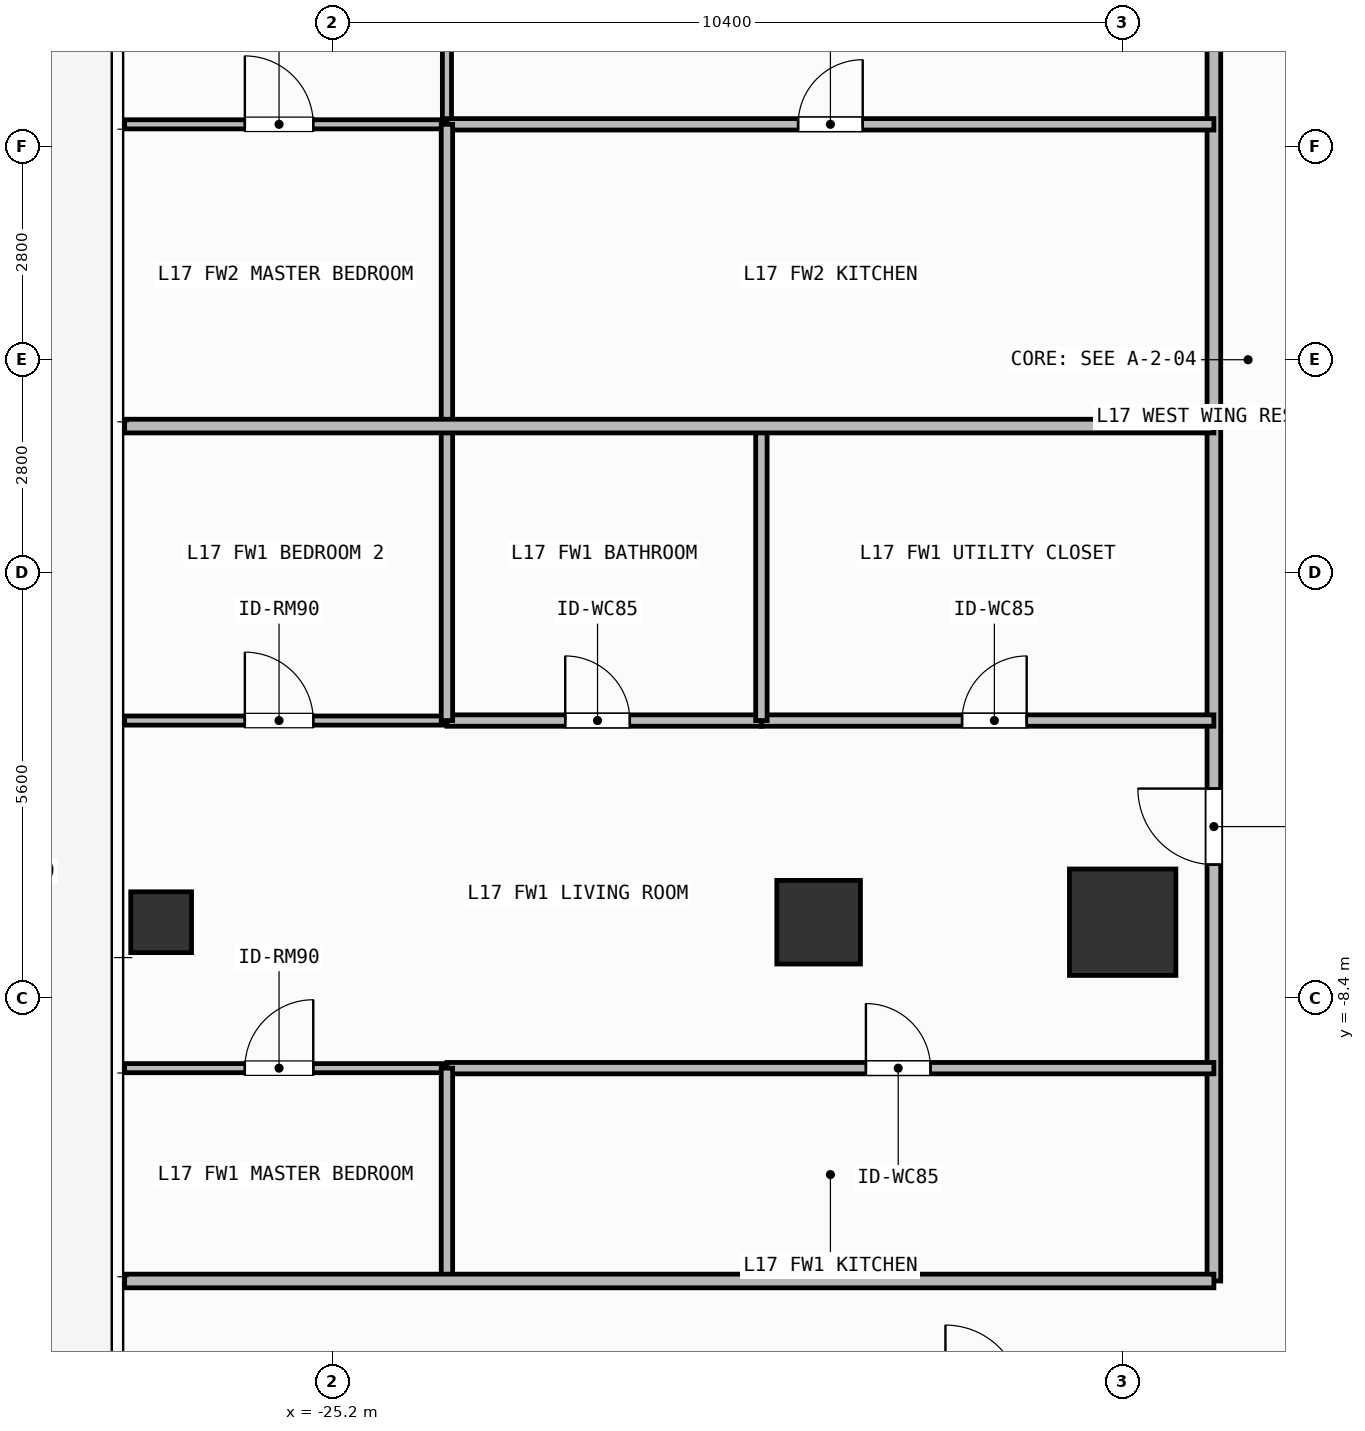
"""IFC4 building model, lengths in metres.
Left out: names, types, materials, properties, quantities, classifications, styles, units other than length and angle.
Written with IfcOpenShell. Run it as: python <this file> out.ifc"""

import sys

from ifc_helpers import new_model, si_unit, direction, frame, frame_2d, origin, origin_2d, place, context, subcontext, project, spatial, rectangle, hollow_rectangle, extrude, element, fill, save


model = new_model("IFC4")
c1 = context("Model", 3, precision=1e-05, world=origin(), true_north=direction((0.0, 1.0)))
c2 = subcontext(c1, "Body", "Model", "MODEL_VIEW")
j1 = project(units=[si_unit("LENGTHUNIT", "METRE"), si_unit("PLANEANGLEUNIT", "RADIAN")], contexts=[c1])
p1 = place(None, origin())
s1 = spatial("IfcSite", under=j1, at=p1, CompositionType="ELEMENT")
p2 = place(p1, origin())
s2 = spatial("IfcBuilding", under=s1, at=p2, CompositionType="ELEMENT")
p3 = place(p2, frame((0.0, 0.0, 65.7)))
s3 = spatial("IfcBuildingStorey", under=s2, at=p3, CompositionType="ELEMENT", Elevation=65.7)
p4 = place(p3, frame((-14.8, -7.4, 0.0), z_axis=(0.0, 0.0, 1.0), x_axis=(1.0, 0.0, 0.0)))
e1 = element("IfcColumn", 1, at=p4, inside=s3, PredefinedType="COLUMN", context=c2, shape_type="SweptSolid", body=[
    extrude(rectangle(XDim=1.4, YDim=1.4, at=origin_2d()), origin(), (0.0, 0.0, 1.0), 3.9),
])
p5 = place(p3, frame((-18.8, -7.4, 0.0), z_axis=(0.0, 0.0, 1.0), x_axis=(1.0, 0.0, 0.0)))
e2 = element("IfcColumn", 2, at=p5, inside=s3, PredefinedType="COLUMN", context=c2, shape_type="SweptSolid", body=[
    extrude(rectangle(XDim=1.1, YDim=1.1, at=origin_2d()), origin(), (0.0, 0.0, 1.0), 3.9),
])
p6 = place(p3, frame((-27.45, -7.4, 0.0), z_axis=(0.0, 0.0, 1.0), x_axis=(1.0, 0.0, 0.0)))
e3 = element("IfcColumn", 3, at=p6, inside=s3, PredefinedType="COLUMN", context=c2, shape_type="SweptSolid", body=[
    extrude(hollow_rectangle(XDim=0.8, YDim=0.8, WallThickness=0.036, at=origin_2d()), origin(), (0.0, 0.0, 1.0), 3.9),
])
p7 = place(p3, frame((-13.6, -12.12, 0.0), z_axis=(0.0, 0.0, 1.0), x_axis=(0.0, 1.0, 0.0)))
e4 = element("IfcWall", 4, at=p7, inside=s3, PredefinedType="PARTITIONING", context=c2, shape_type="SweptSolid", body=[
    extrude(rectangle(XDim=11.247, YDim=0.18, at=frame_2d((5.624, 0.0))), origin(), (0.0, 0.0, 1.0), 3.68),
])
p8 = place(p7, frame((5.478, 0.0, 0.0)))
e5 = element("IfcOpeningElement", 5, at=p8, cuts=e4, PredefinedType="OPENING", context=c2, shape_type="SweptSolid", body=[
    extrude(rectangle(XDim=1.0, YDim=2.2, at=frame_2d((0.5, 1.1))), frame((0.0, 0.1, 0.0), z_axis=(0.0, -1.0, 0.0), x_axis=(1.0, 0.0, 0.0)), (0.0, 0.0, 1.0), 0.2),
])
p9 = place(p3, frame((-23.69, -4.747, 0.0), z_axis=(0.0, 0.0, 1.0), x_axis=(1.0, 0.0, 0.0)))
e6 = element("IfcWall", 6, at=p9, inside=s3, PredefinedType="PARTITIONING", context=c2, shape_type="SweptSolid", body=[
    extrude(rectangle(XDim=4.137, YDim=0.15, at=frame_2d((2.068, 0.0))), origin(), (0.0, 0.0, 1.0), 3.68),
])
p10 = place(p9, frame((1.556, 0.0, 0.0)))
e7 = element("IfcOpeningElement", 7, at=p10, cuts=e6, PredefinedType="OPENING", context=c2, shape_type="SweptSolid", body=[
    extrude(rectangle(XDim=0.85, YDim=2.1, at=frame_2d((0.425, 1.05))), frame((0.0, 0.085, 0.0), z_axis=(0.0, -1.0, 0.0), x_axis=(1.0, 0.0, 0.0)), (0.0, 0.0, 1.0), 0.17),
])
p11 = place(p3, frame((-19.553, -4.747, 0.0), z_axis=(0.0, 0.0, 1.0), x_axis=(1.0, 0.0, 0.0)))
e8 = element("IfcWall", 8, at=p11, inside=s3, PredefinedType="PARTITIONING", context=c2, shape_type="SweptSolid", body=[
    extrude(rectangle(XDim=5.953, YDim=0.15, at=frame_2d((2.977, 0.0))), origin(), (0.0, 0.0, 1.0), 3.68),
])
p12 = place(p11, frame((2.64, 0.0, 0.0)))
e9 = element("IfcOpeningElement", 9, at=p12, cuts=e8, PredefinedType="OPENING", context=c2, shape_type="SweptSolid", body=[
    extrude(rectangle(XDim=0.85, YDim=2.1, at=frame_2d((0.425, 1.05))), frame((0.0, 0.085, 0.0), z_axis=(0.0, -1.0, 0.0), x_axis=(1.0, 0.0, 0.0)), (0.0, 0.0, 1.0), 0.17),
])
p13 = place(p3, frame((-23.69, -9.32, 0.0), z_axis=(0.0, 0.0, 1.0), x_axis=(1.0, 0.0, 0.0)))
e10 = element("IfcWall", 10, at=p13, inside=s3, PredefinedType="PARTITIONING", context=c2, shape_type="SweptSolid", body=[
    extrude(rectangle(XDim=10.09, YDim=0.15, at=frame_2d((5.045, 0.0))), origin(), (0.0, 0.0, 1.0), 3.68),
])
p14 = place(p13, frame((5.512, 0.0, 0.0)))
e11 = element("IfcOpeningElement", 11, at=p14, cuts=e10, PredefinedType="OPENING", context=c2, shape_type="SweptSolid", body=[
    extrude(rectangle(XDim=0.85, YDim=2.1, at=frame_2d((0.425, 1.05))), frame((0.0, 0.085, 0.0), z_axis=(0.0, -1.0, 0.0), x_axis=(1.0, 0.0, 0.0)), (0.0, 0.0, 1.0), 0.17),
])
p15 = place(p3, frame((-27.93, -9.32, 0.0), z_axis=(0.0, 0.0, 1.0), x_axis=(1.0, 0.0, 0.0)))
e12 = element("IfcWall", 12, at=p15, inside=s3, PredefinedType="PARTITIONING", context=c2, shape_type="SweptSolid", body=[
    extrude(rectangle(XDim=4.24, YDim=0.12, at=frame_2d((2.12, 0.0))), origin(), (0.0, 0.0, 1.0), 3.68),
])
p16 = place(p15, frame((1.581, 0.0, 0.0)))
e13 = element("IfcOpeningElement", 13, at=p16, cuts=e12, PredefinedType="OPENING", context=c2, shape_type="SweptSolid", body=[
    extrude(rectangle(XDim=0.9, YDim=2.1, at=frame_2d((0.45, 1.05))), frame((0.0, 0.07, 0.0), z_axis=(0.0, -1.0, 0.0), x_axis=(1.0, 0.0, 0.0)), (0.0, 0.0, 1.0), 0.14),
])
p17 = place(p3, frame((-27.93, -4.747, 0.0), z_axis=(0.0, 0.0, 1.0), x_axis=(1.0, 0.0, 0.0)))
e14 = element("IfcWall", 14, at=p17, inside=s3, PredefinedType="PARTITIONING", context=c2, shape_type="SweptSolid", body=[
    extrude(rectangle(XDim=4.24, YDim=0.12, at=frame_2d((2.12, 0.0))), origin(), (0.0, 0.0, 1.0), 3.68),
])
p18 = place(p17, frame((1.581, 0.0, 0.0)))
e15 = element("IfcOpeningElement", 15, at=p18, cuts=e14, PredefinedType="OPENING", context=c2, shape_type="SweptSolid", body=[
    extrude(rectangle(XDim=0.9, YDim=2.1, at=frame_2d((0.45, 1.05))), frame((0.0, 0.07, 0.0), z_axis=(0.0, -1.0, 0.0), x_axis=(1.0, 0.0, 0.0)), (0.0, 0.0, 1.0), 0.14),
])
p19 = place(p3, frame((-13.6, -0.873, 0.0), z_axis=(0.0, 0.0, 1.0), x_axis=(0.0, 1.0, 0.0)))
e16 = element("IfcWall", 16, at=p19, inside=s3, PredefinedType="PARTITIONING", context=c2, shape_type="SweptSolid", body=[
    extrude(rectangle(XDim=12.993, YDim=0.18, at=frame_2d((6.497, 0.0))), origin(), (0.0, 0.0, 1.0), 3.68),
])
p20 = place(p19, frame((6.446, 0.0, 0.0)))
e17 = element("IfcOpeningElement", 17, at=p20, cuts=e16, PredefinedType="OPENING", context=c2, shape_type="SweptSolid", body=[
    extrude(rectangle(XDim=1.0, YDim=2.2, at=frame_2d((0.5, 1.1))), frame((0.0, 0.1, 0.0), z_axis=(0.0, -1.0, 0.0), x_axis=(1.0, 0.0, 0.0)), (0.0, 0.0, 1.0), 0.2),
])
p21 = place(p3, frame((-23.69, 3.097, 0.0), z_axis=(0.0, 0.0, 1.0), x_axis=(0.0, 1.0, 0.0)))
e18 = element("IfcWall", 18, at=p21, inside=s3, PredefinedType="PARTITIONING", context=c2, shape_type="SweptSolid", body=[
    extrude(rectangle(XDim=6.223, YDim=0.12, at=frame_2d((3.112, 0.0))), origin(), (0.0, 0.0, 1.0), 3.68),
])
p22 = place(p21, frame((2.662, 0.0, 0.0)))
e19 = element("IfcOpeningElement", 19, at=p22, cuts=e18, PredefinedType="OPENING", context=c2, shape_type="SweptSolid", body=[
    extrude(rectangle(XDim=0.9, YDim=2.1, at=frame_2d((0.45, 1.05))), frame((0.0, 0.07, 0.0), z_axis=(0.0, -1.0, 0.0), x_axis=(1.0, 0.0, 0.0)), (0.0, 0.0, 1.0), 0.14),
])
p23 = place(p3, frame((-23.69, 3.097, 0.0), z_axis=(0.0, 0.0, 1.0), x_axis=(1.0, 0.0, 0.0)))
e20 = element("IfcWall", 20, at=p23, inside=s3, PredefinedType="PARTITIONING", context=c2, shape_type="SweptSolid", body=[
    extrude(rectangle(XDim=10.09, YDim=0.15, at=frame_2d((5.045, 0.0))), origin(), (0.0, 0.0, 1.0), 3.68),
])
p24 = place(p23, frame((4.62, 0.0, 0.0)))
e21 = element("IfcOpeningElement", 21, at=p24, cuts=e20, PredefinedType="OPENING", context=c2, shape_type="SweptSolid", body=[
    extrude(rectangle(XDim=0.85, YDim=2.1, at=frame_2d((0.425, 1.05))), frame((0.0, 0.085, 0.0), z_axis=(0.0, -1.0, 0.0), x_axis=(1.0, 0.0, 0.0)), (0.0, 0.0, 1.0), 0.17),
])
p25 = place(p3, frame((-27.93, 3.097, 0.0), z_axis=(0.0, 0.0, 1.0), x_axis=(1.0, 0.0, 0.0)))
e22 = element("IfcWall", 22, at=p25, inside=s3, PredefinedType="PARTITIONING", context=c2, shape_type="SweptSolid", body=[
    extrude(rectangle(XDim=4.24, YDim=0.12, at=frame_2d((2.12, 0.0))), origin(), (0.0, 0.0, 1.0), 3.68),
])
p26 = place(p25, frame((1.581, 0.0, 0.0)))
e23 = element("IfcOpeningElement", 23, at=p26, cuts=e22, PredefinedType="OPENING", context=c2, shape_type="SweptSolid", body=[
    extrude(rectangle(XDim=0.9, YDim=2.1, at=frame_2d((0.45, 1.05))), frame((0.0, 0.07, 0.0), z_axis=(0.0, -1.0, 0.0), x_axis=(1.0, 0.0, 0.0)), (0.0, 0.0, 1.0), 0.14),
])
p27 = place(p3, frame((-19.553, -4.747, 0.0), z_axis=(0.0, 0.0, 1.0), x_axis=(0.0, 1.0, 0.0)))
e24 = element("IfcWall", 24, at=p27, inside=s3, PredefinedType="PARTITIONING", context=c2, shape_type="SweptSolid", body=[
    extrude(rectangle(XDim=3.874, YDim=0.15, at=frame_2d((1.937, 0.0))), origin(), (0.0, 0.0, 1.0), 3.68),
])
p28 = place(p3, frame((-23.69, -12.12, 0.0), z_axis=(0.0, 0.0, 1.0), x_axis=(0.0, 1.0, 0.0)))
e25 = element("IfcWall", 25, at=p28, inside=s3, PredefinedType="PARTITIONING", context=c2, shape_type="SweptSolid", body=[
    extrude(rectangle(XDim=2.8, YDim=0.15, at=frame_2d((1.4, 0.0))), origin(), (0.0, 0.0, 1.0), 3.68),
])
p29 = place(p3, frame((-23.69, -4.747, 0.0), z_axis=(0.0, 0.0, 1.0), x_axis=(0.0, 1.0, 0.0)))
e26 = element("IfcWall", 26, at=p29, inside=s3, PredefinedType="PARTITIONING", context=c2, shape_type="SweptSolid", body=[
    extrude(rectangle(XDim=3.874, YDim=0.15, at=frame_2d((1.937, 0.0))), origin(), (0.0, 0.0, 1.0), 3.68),
])
p30 = place(p3, frame((-23.69, -0.873, 0.0), z_axis=(0.0, 0.0, 1.0), x_axis=(0.0, 1.0, 0.0)))
e27 = element("IfcWall", 27, at=p30, inside=s3, PredefinedType="PARTITIONING", context=c2, shape_type="SweptSolid", body=[
    extrude(rectangle(XDim=3.97, YDim=0.15, at=frame_2d((1.985, 0.0))), origin(), (0.0, 0.0, 1.0), 3.68),
])
for number, where, z_axis, x_axis in (
    (28, (-27.93, -0.873, 0.0), (0.0, 0.0, 1.0), (1.0, 0.0, 0.0)),
    (29, (-27.93, -12.12, 0.0), (0.0, 0.0, 1.0), (1.0, 0.0, 0.0)),
):
    element("IfcWall", number, at=place(p3, frame(where, z_axis=z_axis, x_axis=x_axis)), inside=s3, PredefinedType="PARTITIONING", context=c2, shape_type="SweptSolid", body=[
        extrude(rectangle(XDim=14.33, YDim=0.18, at=frame_2d((7.165, 0.0))), origin(), (0.0, 0.0, 1.0), 3.68),
    ])
p31 = place(p8, origin())
e30 = element("IfcDoor", 30, at=p31, inside=s3, OperationType="SINGLE_SWING_RIGHT", PredefinedType="DOOR", context=c2, shape_type="SweptSolid", body=[
    extrude(rectangle(XDim=1.0, YDim=2.2, at=frame_2d((0.5, 1.1))), frame((0.0, 0.025, 0.0), z_axis=(0.0, -1.0, 0.0), x_axis=(1.0, 0.0, 0.0)), (0.0, 0.0, 1.0), 0.05),
])
fill(e5, e30)
p32 = place(p10, origin())
e31 = element("IfcDoor", 31, at=p32, inside=s3, OperationType="SINGLE_SWING_LEFT", PredefinedType="DOOR", context=c2, shape_type="SweptSolid", body=[
    extrude(rectangle(XDim=0.85, YDim=2.1, at=frame_2d((0.425, 1.05))), frame((0.0, 0.025, 0.0), z_axis=(0.0, -1.0, 0.0), x_axis=(1.0, 0.0, 0.0)), (0.0, 0.0, 1.0), 0.05),
])
fill(e7, e31)
p33 = place(p12, origin())
e32 = element("IfcDoor", 32, at=p33, inside=s3, OperationType="SINGLE_SWING_RIGHT", PredefinedType="DOOR", context=c2, shape_type="SweptSolid", body=[
    extrude(rectangle(XDim=0.85, YDim=2.1, at=frame_2d((0.425, 1.05))), frame((0.0, 0.025, 0.0), z_axis=(0.0, -1.0, 0.0), x_axis=(1.0, 0.0, 0.0)), (0.0, 0.0, 1.0), 0.05),
])
fill(e9, e32)
p34 = place(p14, origin())
e33 = element("IfcDoor", 33, at=p34, inside=s3, OperationType="SINGLE_SWING_LEFT", PredefinedType="DOOR", context=c2, shape_type="SweptSolid", body=[
    extrude(rectangle(XDim=0.85, YDim=2.1, at=frame_2d((0.425, 1.05))), frame((0.0, 0.025, 0.0), z_axis=(0.0, -1.0, 0.0), x_axis=(1.0, 0.0, 0.0)), (0.0, 0.0, 1.0), 0.05),
])
fill(e11, e33)
p35 = place(p16, origin())
e34 = element("IfcDoor", 34, at=p35, inside=s3, OperationType="SINGLE_SWING_RIGHT", PredefinedType="DOOR", context=c2, shape_type="SweptSolid", body=[
    extrude(rectangle(XDim=0.9, YDim=2.1, at=frame_2d((0.45, 1.05))), frame((0.0, 0.025, 0.0), z_axis=(0.0, -1.0, 0.0), x_axis=(1.0, 0.0, 0.0)), (0.0, 0.0, 1.0), 0.05),
])
fill(e13, e34)
p36 = place(p18, origin())
e35 = element("IfcDoor", 35, at=p36, inside=s3, OperationType="SINGLE_SWING_LEFT", PredefinedType="DOOR", context=c2, shape_type="SweptSolid", body=[
    extrude(rectangle(XDim=0.9, YDim=2.1, at=frame_2d((0.45, 1.05))), frame((0.0, 0.025, 0.0), z_axis=(0.0, -1.0, 0.0), x_axis=(1.0, 0.0, 0.0)), (0.0, 0.0, 1.0), 0.05),
])
fill(e15, e35)
p37 = place(p24, origin())
e36 = element("IfcDoor", 36, at=p37, inside=s3, OperationType="SINGLE_SWING_RIGHT", PredefinedType="DOOR", context=c2, shape_type="SweptSolid", body=[
    extrude(rectangle(XDim=0.85, YDim=2.1, at=frame_2d((0.425, 1.05))), frame((0.0, 0.025, 0.0), z_axis=(0.0, -1.0, 0.0), x_axis=(1.0, 0.0, 0.0)), (0.0, 0.0, 1.0), 0.05),
])
fill(e21, e36)
p38 = place(p26, origin())
e37 = element("IfcDoor", 37, at=p38, inside=s3, OperationType="SINGLE_SWING_LEFT", PredefinedType="DOOR", context=c2, shape_type="SweptSolid", body=[
    extrude(rectangle(XDim=0.9, YDim=2.1, at=frame_2d((0.45, 1.05))), frame((0.0, 0.025, 0.0), z_axis=(0.0, -1.0, 0.0), x_axis=(1.0, 0.0, 0.0)), (0.0, 0.0, 1.0), 0.05),
])
fill(e23, e37)
save(model, sys.argv[1])
